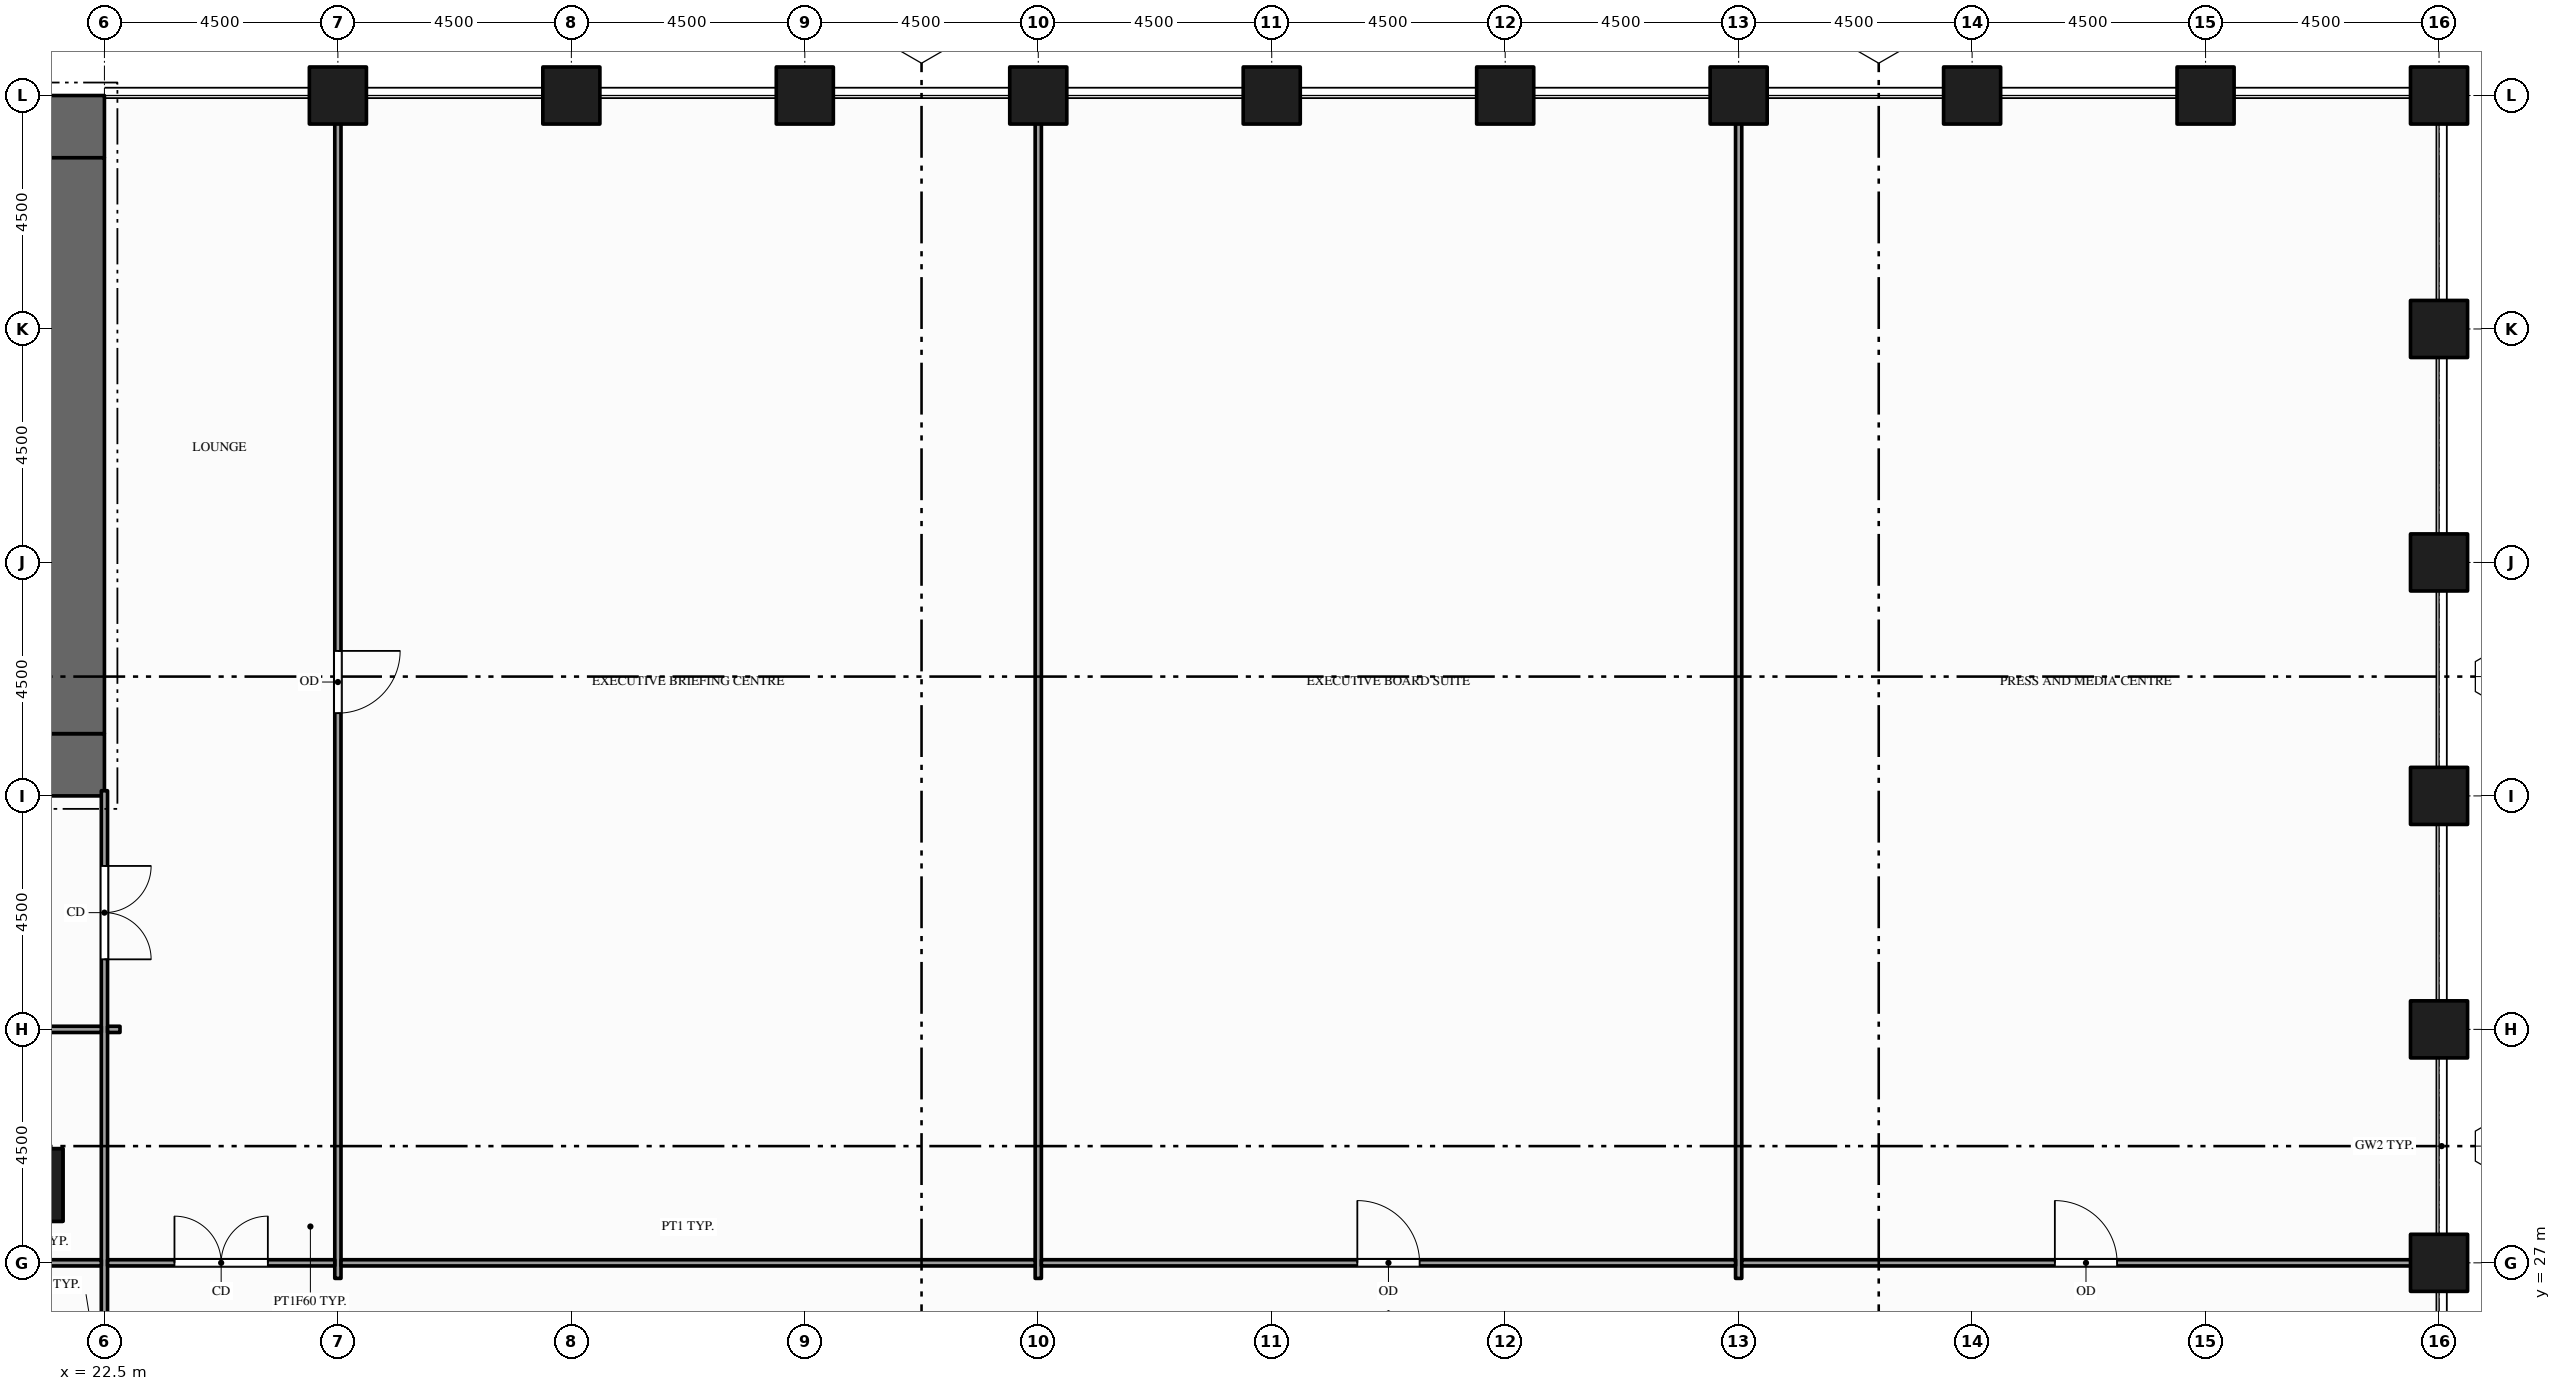
"""IFC4 building model, lengths in metres.
Left out: names, types, materials, properties, quantities, classifications, styles, units other than length and angle.
Written with IfcOpenShell. Run it as: python <this file> out.ifc"""

import sys

from ifc_helpers import new_model, si_unit, direction, frame, frame_2d, origin, origin_2d, place, context, subcontext, project, spatial, rectangle, hollow_rectangle, extrude, element, fill, save


model = new_model("IFC4")
c1 = context("Model", 3, precision=1e-05, world=origin(), true_north=direction((0.0, 1.0)))
c2 = subcontext(c1, "Body", "Model", "MODEL_VIEW")
j1 = project(units=[si_unit("LENGTHUNIT", "METRE"), si_unit("PLANEANGLEUNIT", "RADIAN")], contexts=[c1])
p1 = place(None, origin())
s1 = spatial("IfcSite", under=j1, at=p1, CompositionType="ELEMENT")
p2 = place(p1, origin())
s2 = spatial("IfcBuilding", under=s1, at=p2, CompositionType="ELEMENT")
p3 = place(p2, frame((0.0, 0.0, 24.0)))
s3 = spatial("IfcBuildingStorey", under=s2, at=p3, CompositionType="ELEMENT", Elevation=24.0)
p4 = place(p3, frame((0.0, 36.6, -0.15), z_axis=(0.0, 0.0, 1.0), x_axis=(1.0, 0.0, 0.0)))
e1 = element("IfcWall", 1, at=p4, inside=s3, PredefinedType="SHEAR", context=c2, shape_type="SweptSolid", body=[
    extrude(rectangle(XDim=22.5, YDim=1.2, at=frame_2d((11.25, 0.0))), origin(), (0.0, 0.0, 1.0), 5.0),
])
p5 = place(p4, frame((7.1, 0.0, 0.15)))
e2 = element("IfcOpeningElement", 2, at=p5, cuts=e1, PredefinedType="OPENING", context=c2, shape_type="SweptSolid", body=[
    extrude(rectangle(XDim=1.8, YDim=2.1, at=frame_2d((0.9, 1.05))), frame((0.0, 0.61, 0.0), z_axis=(0.0, -1.0, 0.0), x_axis=(1.0, 0.0, 0.0)), (0.0, 0.0, 1.0), 1.22),
])
p6 = place(p4, frame((13.15, 0.0, 0.15)))
e3 = element("IfcOpeningElement", 3, at=p6, cuts=e1, PredefinedType="OPENING", context=c2, shape_type="SweptSolid", body=[
    extrude(rectangle(XDim=1.1, YDim=2.1, at=frame_2d((0.55, 1.05))), frame((0.0, 0.61, 0.0), z_axis=(0.0, -1.0, 0.0), x_axis=(1.0, 0.0, 0.0)), (0.0, 0.0, 1.0), 1.22),
])
p7 = place(p4, frame((2.15, 0.0, 0.15)))
e4 = element("IfcOpeningElement", 4, at=p7, cuts=e1, PredefinedType="OPENING", context=c2, shape_type="SweptSolid", body=[
    extrude(rectangle(XDim=1.1, YDim=2.1, at=frame_2d((0.55, 1.05))), frame((0.0, 0.61, 0.0), z_axis=(0.0, -1.0, 0.0), x_axis=(1.0, 0.0, 0.0)), (0.0, 0.0, 1.0), 1.22),
])
p8 = place(p4, frame((19.35, 0.0, 0.15)))
e5 = element("IfcOpeningElement", 5, at=p8, cuts=e1, PredefinedType="OPENING", context=c2, shape_type="SweptSolid", body=[
    extrude(rectangle(XDim=1.1, YDim=2.1, at=frame_2d((0.55, 1.05))), frame((0.0, 0.61, 0.0), z_axis=(0.0, -1.0, 0.0), x_axis=(1.0, 0.0, 0.0)), (0.0, 0.0, 1.0), 1.22),
])
p9 = place(p3, frame((0.0, 48.9, -0.15), z_axis=(0.0, 0.0, 1.0), x_axis=(1.0, 0.0, 0.0)))
e6 = element("IfcWall", 6, at=p9, inside=s3, PredefinedType="SHEAR", context=c2, shape_type="SweptSolid", body=[
    extrude(rectangle(XDim=22.5, YDim=1.2, at=frame_2d((11.25, 0.0))), origin(), (0.0, 0.0, 1.0), 5.0),
])
p10 = place(p3, frame((21.9, 37.2, -0.15), z_axis=(0.0, 0.0, 1.0), x_axis=(0.0, 1.0, 0.0)))
e7 = element("IfcWall", 7, at=p10, inside=s3, PredefinedType="SHEAR", context=c2, shape_type="SweptSolid", body=[
    extrude(rectangle(XDim=11.1, YDim=1.2, at=frame_2d((5.55, 0.0))), origin(), (0.0, 0.0, 1.0), 5.0),
])
p11 = place(p3, frame((21.0, 28.5, -0.25), z_axis=(0.0, 0.0, 1.0), x_axis=(1.0, 0.0, 0.0)))
e8 = element("IfcColumn", 8, at=p11, inside=s3, PredefinedType="COLUMN", context=c2, shape_type="SweptSolid", body=[
    extrude(hollow_rectangle(XDim=1.4, YDim=1.4, WallThickness=0.08, at=origin_2d()), origin(), (0.0, 0.0, 1.0), 3.45),
])
p12 = place(p3, frame((21.0, 28.5, 3.2), z_axis=(0.0, 0.0, 1.0), x_axis=(1.0, 0.0, 0.0)))
e9 = element("IfcColumn", 9, at=p12, inside=s3, PredefinedType="COLUMN", context=c2, shape_type="SweptSolid", body=[
    extrude(rectangle(XDim=1.4, YDim=1.4, at=origin_2d()), origin(), (0.0, 0.0, 1.0), 1.5),
])
for number, where, z_axis, x_axis in (
    (10, (27.0, 49.5, -0.25), (0.0, 0.0, 1.0), (1.0, 0.0, 0.0)),
    (11, (31.5, 49.5, -0.25), (0.0, 0.0, 1.0), (1.0, 0.0, 0.0)),
    (12, (36.0, 49.5, -0.25), (0.0, 0.0, 1.0), (1.0, 0.0, 0.0)),
    (13, (40.5, 49.5, -0.25), (0.0, 0.0, 1.0), (1.0, 0.0, 0.0)),
    (14, (45.0, 49.5, -0.25), (0.0, 0.0, 1.0), (1.0, 0.0, 0.0)),
    (15, (49.5, 49.5, -0.25), (0.0, 0.0, 1.0), (1.0, 0.0, 0.0)),
    (16, (54.0, 49.5, -0.25), (0.0, 0.0, 1.0), (1.0, 0.0, 0.0)),
    (17, (58.5, 49.5, -0.25), (0.0, 0.0, 1.0), (1.0, 0.0, 0.0)),
    (18, (63.0, 49.5, -0.25), (0.0, 0.0, 1.0), (1.0, 0.0, 0.0)),
    (19, (67.5, 27.0, -0.25), (0.0, 0.0, 1.0), (1.0, 0.0, 0.0)),
    (20, (67.5, 31.5, -0.25), (0.0, 0.0, 1.0), (1.0, 0.0, 0.0)),
    (21, (67.5, 36.0, -0.25), (0.0, 0.0, 1.0), (1.0, 0.0, 0.0)),
    (22, (67.5, 40.5, -0.25), (0.0, 0.0, 1.0), (1.0, 0.0, 0.0)),
    (23, (67.5, 45.0, -0.25), (0.0, 0.0, 1.0), (1.0, 0.0, 0.0)),
    (24, (67.5, 49.5, -0.25), (0.0, 0.0, 1.0), (1.0, 0.0, 0.0)),
):
    element("IfcColumn", number, at=place(p3, frame(where, z_axis=z_axis, x_axis=x_axis)), inside=s3, PredefinedType="COLUMN", context=c2, shape_type="SweptSolid", body=[
        extrude(hollow_rectangle(XDim=1.1, YDim=1.1, WallThickness=0.06, at=origin_2d()), origin(), (0.0, 0.0, 1.0), 4.95),
    ])
p13 = place(p3, frame((22.5, 0.15, 0.0), z_axis=(0.0, 0.0, 1.0), x_axis=(0.0, 1.0, 0.0)))
e25 = element("IfcWall", 25, at=p13, inside=s3, PredefinedType="PARTITIONING", context=c2, shape_type="SweptSolid", body=[
    extrude(rectangle(XDim=35.95, YDim=0.12, at=frame_2d((17.975, 0.0))), origin(), (0.0, 0.0, 1.0), 3.3),
])
p14 = place(p13, frame((9.225, 0.0, 0.0)))
e26 = element("IfcOpeningElement", 26, at=p14, cuts=e25, PredefinedType="OPENING", context=c2, shape_type="SweptSolid", body=[
    extrude(rectangle(XDim=1.5, YDim=2.1, at=frame_2d((0.75, 1.05))), frame((0.0, 0.07, 0.0), z_axis=(0.0, -1.0, 0.0), x_axis=(1.0, 0.0, 0.0)), (0.0, 0.0, 1.0), 0.14),
])
p15 = place(p13, frame((32.7, 0.0, 0.0)))
e27 = element("IfcOpeningElement", 27, at=p15, cuts=e25, PredefinedType="OPENING", context=c2, shape_type="SweptSolid", body=[
    extrude(rectangle(XDim=1.8, YDim=2.1, at=frame_2d((0.9, 1.05))), frame((0.0, 0.07, 0.0), z_axis=(0.0, -1.0, 0.0), x_axis=(1.0, 0.0, 0.0)), (0.0, 0.0, 1.0), 0.14),
])
p16 = place(p3, frame((27.0, 26.7, 0.0), z_axis=(0.0, 0.0, 1.0), x_axis=(0.0, 1.0, 0.0)))
e28 = element("IfcWall", 28, at=p16, inside=s3, PredefinedType="PARTITIONING", context=c2, shape_type="SweptSolid", body=[
    extrude(rectangle(XDim=22.65, YDim=0.12, at=frame_2d((11.325, 0.0))), origin(), (0.0, 0.0, 1.0), 3.61),
])
p17 = place(p16, frame((10.895, 0.0, 0.0)))
e29 = element("IfcOpeningElement", 29, at=p17, cuts=e28, PredefinedType="OPENING", context=c2, shape_type="SweptSolid", body=[
    extrude(rectangle(XDim=1.2, YDim=2.1, at=frame_2d((0.6, 1.05))), frame((0.0, 0.07, 0.0), z_axis=(0.0, -1.0, 0.0), x_axis=(1.0, 0.0, 0.0)), (0.0, 0.0, 1.0), 0.14),
])
for number, where, z_axis, x_axis in (
    (30, (40.5, 26.7, 0.0), (0.0, 0.0, 1.0), (0.0, 1.0, 0.0)),
    (31, (54.0, 26.7, 0.0), (0.0, 0.0, 1.0), (0.0, 1.0, 0.0)),
):
    element("IfcWall", number, at=place(p3, frame(where, z_axis=z_axis, x_axis=x_axis)), inside=s3, PredefinedType="PARTITIONING", context=c2, shape_type="SweptSolid", body=[
        extrude(rectangle(XDim=22.65, YDim=0.12, at=frame_2d((11.325, 0.0))), origin(), (0.0, 0.0, 1.0), 3.61),
    ])
p18 = place(p3, frame((11.31, 27.0, 0.0), z_axis=(0.0, 0.0, 1.0), x_axis=(1.0, 0.0, 0.0)))
e32 = element("IfcWall", 32, at=p18, inside=s3, PredefinedType="PARTITIONING", context=c2, shape_type="SweptSolid", body=[
    extrude(rectangle(XDim=11.13, YDim=0.12, at=frame_2d((5.565, 0.0))), origin(), (0.0, 0.0, 1.0), 3.788),
])
p19 = place(p3, frame((22.56, 27.0, 0.0), z_axis=(0.0, 0.0, 1.0), x_axis=(1.0, 0.0, 0.0)))
e33 = element("IfcWall", 33, at=p19, inside=s3, PredefinedType="PARTITIONING", context=c2, shape_type="SweptSolid", body=[
    extrude(rectangle(XDim=4.38, YDim=0.12, at=frame_2d((2.19, 0.0))), origin(), (0.0, 0.0, 1.0), 3.61),
])
p20 = place(p19, frame((1.29, 0.0, 0.0)))
e34 = element("IfcOpeningElement", 34, at=p20, cuts=e33, PredefinedType="OPENING", context=c2, shape_type="SweptSolid", body=[
    extrude(rectangle(XDim=1.8, YDim=2.1, at=frame_2d((0.9, 1.05))), frame((0.0, 0.07, 0.0), z_axis=(0.0, -1.0, 0.0), x_axis=(1.0, 0.0, 0.0)), (0.0, 0.0, 1.0), 0.14),
])
p21 = place(p3, frame((27.06, 27.0, 0.0), z_axis=(0.0, 0.0, 1.0), x_axis=(1.0, 0.0, 0.0)))
e35 = element("IfcWall", 35, at=p21, inside=s3, PredefinedType="PARTITIONING", context=c2, shape_type="SweptSolid", body=[
    extrude(rectangle(XDim=13.38, YDim=0.12, at=frame_2d((6.69, 0.0))), origin(), (0.0, 0.0, 1.0), 3.61),
])
p22 = place(p3, frame((40.56, 27.0, 0.0), z_axis=(0.0, 0.0, 1.0), x_axis=(1.0, 0.0, 0.0)))
e36 = element("IfcWall", 36, at=p22, inside=s3, PredefinedType="PARTITIONING", context=c2, shape_type="SweptSolid", body=[
    extrude(rectangle(XDim=13.38, YDim=0.12, at=frame_2d((6.69, 0.0))), origin(), (0.0, 0.0, 1.0), 3.61),
])
p23 = place(p22, frame((6.09, 0.0, 0.0)))
e37 = element("IfcOpeningElement", 37, at=p23, cuts=e36, PredefinedType="OPENING", context=c2, shape_type="SweptSolid", body=[
    extrude(rectangle(XDim=1.2, YDim=2.1, at=frame_2d((0.6, 1.05))), frame((0.0, 0.07, 0.0), z_axis=(0.0, -1.0, 0.0), x_axis=(1.0, 0.0, 0.0)), (0.0, 0.0, 1.0), 0.14),
])
p24 = place(p3, frame((54.06, 27.0, 0.0), z_axis=(0.0, 0.0, 1.0), x_axis=(1.0, 0.0, 0.0)))
e38 = element("IfcWall", 38, at=p24, inside=s3, PredefinedType="PARTITIONING", context=c2, shape_type="SweptSolid", body=[
    extrude(rectangle(XDim=13.29, YDim=0.12, at=frame_2d((6.645, 0.0))), origin(), (0.0, 0.0, 1.0), 3.61),
])
p25 = place(p24, frame((6.035, 0.0, 0.0)))
e39 = element("IfcOpeningElement", 39, at=p25, cuts=e38, PredefinedType="OPENING", context=c2, shape_type="SweptSolid", body=[
    extrude(rectangle(XDim=1.2, YDim=2.1, at=frame_2d((0.6, 1.05))), frame((0.0, 0.07, 0.0), z_axis=(0.0, -1.0, 0.0), x_axis=(1.0, 0.0, 0.0)), (0.0, 0.0, 1.0), 0.14),
])
p26 = place(p3, frame((11.31, 31.5, 0.0), z_axis=(0.0, 0.0, 1.0), x_axis=(1.0, 0.0, 0.0)))
e40 = element("IfcWall", 40, at=p26, inside=s3, PredefinedType="PARTITIONING", context=c2, shape_type="SweptSolid", body=[
    extrude(rectangle(XDim=11.13, YDim=0.12, at=frame_2d((5.565, 0.0))), origin(), (0.0, 0.0, 1.0), 2.9),
])
p27 = place(p3, frame((22.56, 31.5, 0.0), z_axis=(0.0, 0.0, 1.0), x_axis=(1.0, 0.0, 0.0)))
e41 = element("IfcWall", 41, at=p27, inside=s3, PredefinedType="PARTITIONING", context=c2, shape_type="SweptSolid", body=[
    extrude(rectangle(XDim=0.24, YDim=0.12, at=frame_2d((0.12, 0.0))), origin(), (0.0, 0.0, 1.0), 3.788),
])
p28 = place(p20, origin())
e42 = element("IfcDoor", 42, at=p28, inside=s3, OperationType="DOUBLE_DOOR_SINGLE_SWING", PredefinedType="DOOR", context=c2, shape_type="SweptSolid", body=[
    extrude(rectangle(XDim=1.8, YDim=2.1, at=frame_2d((0.9, 1.05))), frame((0.0, 0.025, 0.0), z_axis=(0.0, -1.0, 0.0), x_axis=(1.0, 0.0, 0.0)), (0.0, 0.0, 1.0), 0.05),
])
fill(e34, e42)
p29 = place(p17, origin())
e43 = element("IfcDoor", 43, at=p29, inside=s3, OperationType="SINGLE_SWING_RIGHT", PredefinedType="DOOR", context=c2, shape_type="SweptSolid", body=[
    extrude(rectangle(XDim=1.2, YDim=2.1, at=frame_2d((0.6, 1.05))), frame((0.0, 0.025, 0.0), z_axis=(0.0, -1.0, 0.0), x_axis=(1.0, 0.0, 0.0)), (0.0, 0.0, 1.0), 0.05),
])
fill(e29, e43)
p30 = place(p23, origin())
e44 = element("IfcDoor", 44, at=p30, inside=s3, OperationType="SINGLE_SWING_LEFT", PredefinedType="DOOR", context=c2, shape_type="SweptSolid", body=[
    extrude(rectangle(XDim=1.2, YDim=2.1, at=frame_2d((0.6, 1.05))), frame((0.0, 0.025, 0.0), z_axis=(0.0, -1.0, 0.0), x_axis=(1.0, 0.0, 0.0)), (0.0, 0.0, 1.0), 0.05),
])
fill(e37, e44)
p31 = place(p25, origin())
e45 = element("IfcDoor", 45, at=p31, inside=s3, OperationType="SINGLE_SWING_LEFT", PredefinedType="DOOR", context=c2, shape_type="SweptSolid", body=[
    extrude(rectangle(XDim=1.2, YDim=2.1, at=frame_2d((0.6, 1.05))), frame((0.0, 0.025, 0.0), z_axis=(0.0, -1.0, 0.0), x_axis=(1.0, 0.0, 0.0)), (0.0, 0.0, 1.0), 0.05),
])
fill(e39, e45)
p32 = place(p15, origin())
e46 = element("IfcDoor", 46, at=p32, inside=s3, OperationType="DOUBLE_DOOR_SINGLE_SWING", PredefinedType="DOOR", context=c2, shape_type="SweptSolid", body=[
    extrude(rectangle(XDim=1.8, YDim=2.1, at=frame_2d((0.9, 1.05))), frame((0.0, 0.025, 0.0), z_axis=(0.0, -1.0, 0.0), x_axis=(1.0, 0.0, 0.0)), (0.0, 0.0, 1.0), 0.05),
])
fill(e27, e46)
save(model, sys.argv[1])
